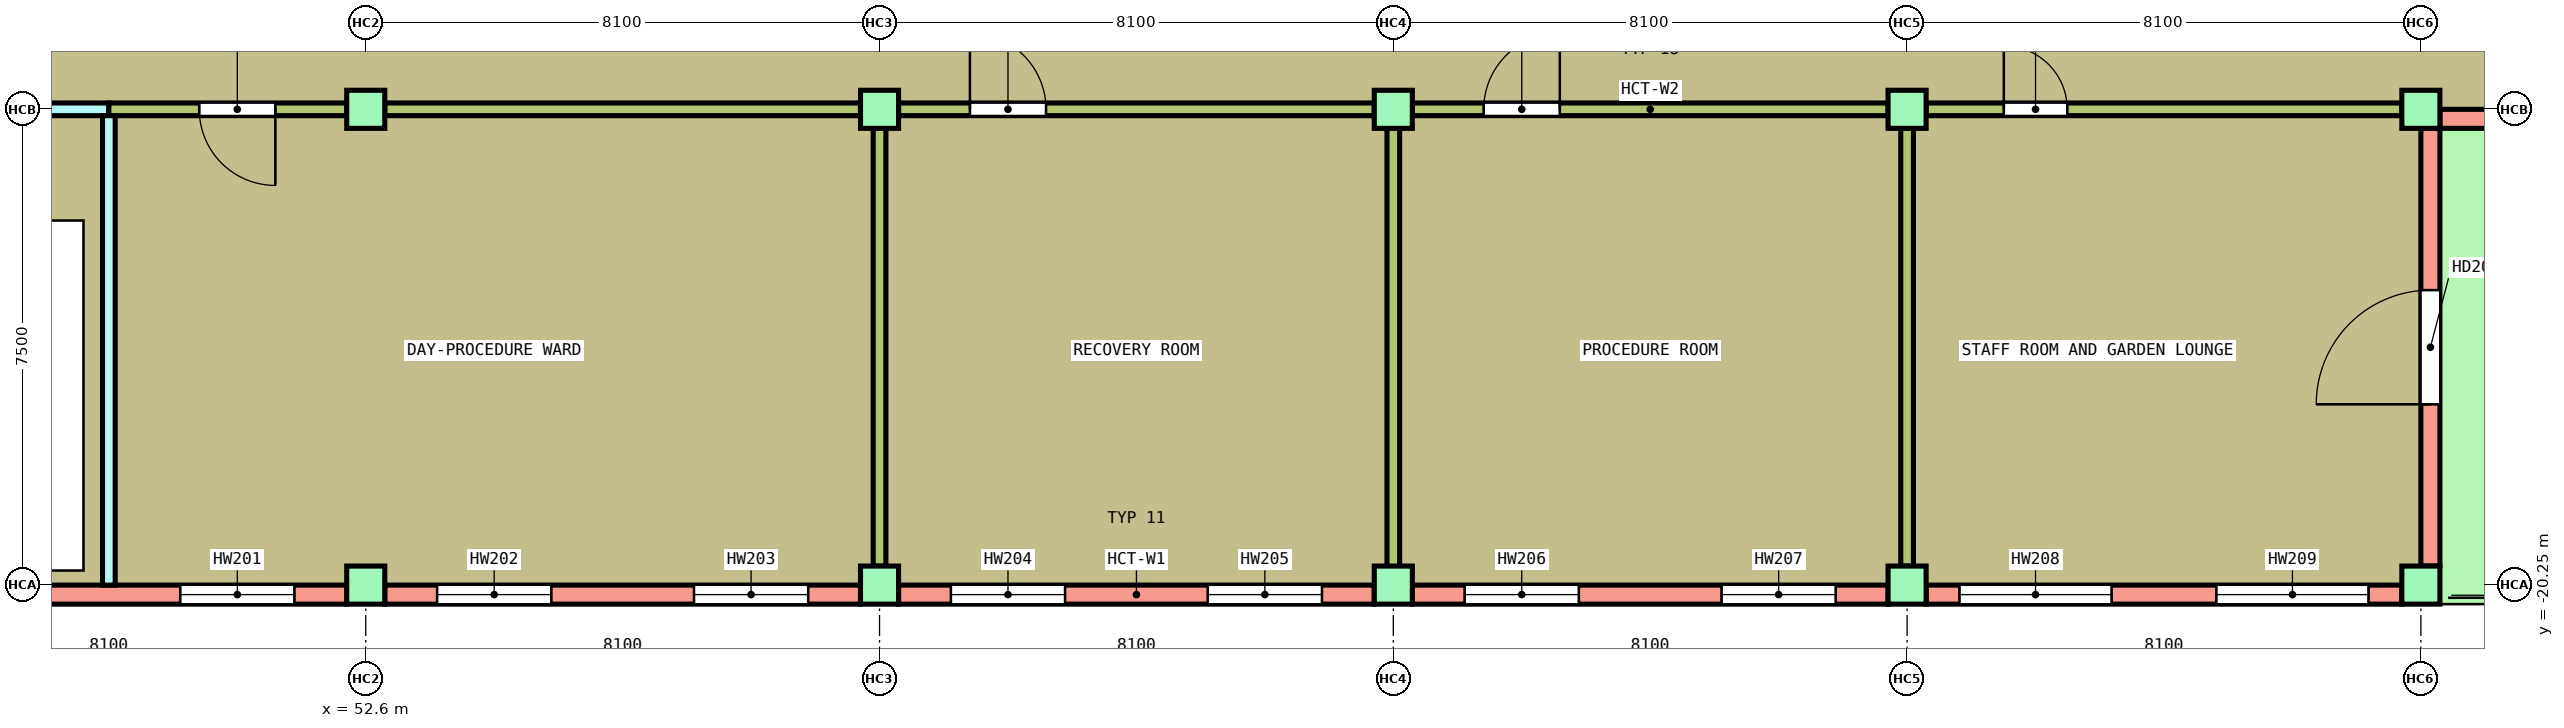
"""IFC4 building model, lengths in metres.
Left out: names, types, materials, properties, quantities, classifications, styles, units other than length and angle.
Written with IfcOpenShell. Run it as: python <this file> out.ifc"""

import sys

from ifc_helpers import new_model, si_unit, direction, frame, frame_2d, origin, origin_2d, place, context, subcontext, project, spatial, rectangle, extrude, element, fill, save


model = new_model("IFC4")
c1 = context("Model", 3, precision=1e-05, world=origin(), true_north=direction((0.0, 1.0)))
c2 = subcontext(c1, "Body", "Model", "MODEL_VIEW")
j1 = project(units=[si_unit("LENGTHUNIT", "METRE"), si_unit("PLANEANGLEUNIT", "RADIAN")], contexts=[c1])
p1 = place(None, origin())
s1 = spatial("IfcSite", under=j1, at=p1, CompositionType="ELEMENT")
p2 = place(p1, origin())
s2 = spatial("IfcBuilding", under=s1, at=p2, CompositionType="ELEMENT")
p3 = place(p2, frame((0.0, 0.0, 10.2)))
s3 = spatial("IfcBuildingStorey", under=s2, at=p3, CompositionType="ELEMENT", Elevation=10.2)
for number, where, z_axis, x_axis in (
    (1, (52.6, -20.25, 0.0), (0.0, 0.0, 1.0), (1.0, 0.0, 0.0)),
    (2, (60.7, -20.25, 0.0), (0.0, 0.0, 1.0), (1.0, 0.0, 0.0)),
    (3, (68.8, -20.25, 0.0), (0.0, 0.0, 1.0), (1.0, 0.0, 0.0)),
    (4, (76.9, -20.25, 0.0), (0.0, 0.0, 1.0), (1.0, 0.0, 0.0)),
    (5, (85.0, -20.25, 0.0), (0.0, 0.0, 1.0), (1.0, 0.0, 0.0)),
    (6, (52.6, -12.75, 0.0), (0.0, 0.0, 1.0), (1.0, 0.0, 0.0)),
    (7, (60.7, -12.75, 0.0), (0.0, 0.0, 1.0), (1.0, 0.0, 0.0)),
    (8, (68.8, -12.75, 0.0), (0.0, 0.0, 1.0), (1.0, 0.0, 0.0)),
    (9, (76.9, -12.75, 0.0), (0.0, 0.0, 1.0), (1.0, 0.0, 0.0)),
    (10, (85.0, -12.75, 0.0), (0.0, 0.0, 1.0), (1.0, 0.0, 0.0)),
):
    element("IfcColumn", number, at=place(p3, frame(where, z_axis=z_axis, x_axis=x_axis)), inside=s3, PredefinedType="COLUMN", context=c2, shape_type="SweptSolid", body=[
        extrude(rectangle(XDim=0.6, YDim=0.6, at=origin_2d()), origin(), (0.0, 0.0, 1.0), 4.15),
    ])
p4 = place(p3, frame((44.8, -20.4, 0.0), z_axis=(0.0, 0.0, 1.0), x_axis=(1.0, 0.0, 0.0)))
e11 = element("IfcWall", 11, at=p4, inside=s3, PredefinedType="SOLIDWALL", context=c2, shape_type="SweptSolid", body=[
    extrude(rectangle(XDim=7.5, YDim=0.3, at=frame_2d((3.75, 0.0))), origin(), (0.0, 0.0, 1.0), 3.6),
])
p5 = place(p4, frame((4.875, 0.0, 0.9)))
e12 = element("IfcOpeningElement", 12, at=p5, cuts=e11, PredefinedType="OPENING", context=c2, shape_type="SweptSolid", body=[
    extrude(rectangle(XDim=1.8, YDim=1.8, at=frame_2d((0.9, 0.9))), frame((0.0, 0.16, 0.0), z_axis=(0.0, -1.0, 0.0), x_axis=(1.0, 0.0, 0.0)), (0.0, 0.0, 1.0), 0.32),
])
p6 = place(p3, frame((52.9, -20.4, 0.0), z_axis=(0.0, 0.0, 1.0), x_axis=(1.0, 0.0, 0.0)))
e13 = element("IfcWall", 13, at=p6, inside=s3, PredefinedType="SOLIDWALL", context=c2, shape_type="SweptSolid", body=[
    extrude(rectangle(XDim=7.5, YDim=0.3, at=frame_2d((3.75, 0.0))), origin(), (0.0, 0.0, 1.0), 3.6),
])
p7 = place(p6, frame((0.825, 0.0, 0.9)))
e14 = element("IfcOpeningElement", 14, at=p7, cuts=e13, PredefinedType="OPENING", context=c2, shape_type="SweptSolid", body=[
    extrude(rectangle(XDim=1.8, YDim=1.8, at=frame_2d((0.9, 0.9))), frame((0.0, 0.16, 0.0), z_axis=(0.0, -1.0, 0.0), x_axis=(1.0, 0.0, 0.0)), (0.0, 0.0, 1.0), 0.32),
])
p8 = place(p6, frame((4.875, 0.0, 0.9)))
e15 = element("IfcOpeningElement", 15, at=p8, cuts=e13, PredefinedType="OPENING", context=c2, shape_type="SweptSolid", body=[
    extrude(rectangle(XDim=1.8, YDim=1.8, at=frame_2d((0.9, 0.9))), frame((0.0, 0.16, 0.0), z_axis=(0.0, -1.0, 0.0), x_axis=(1.0, 0.0, 0.0)), (0.0, 0.0, 1.0), 0.32),
])
p9 = place(p3, frame((61.0, -20.4, 0.0), z_axis=(0.0, 0.0, 1.0), x_axis=(1.0, 0.0, 0.0)))
e16 = element("IfcWall", 16, at=p9, inside=s3, PredefinedType="SOLIDWALL", context=c2, shape_type="SweptSolid", body=[
    extrude(rectangle(XDim=7.5, YDim=0.3, at=frame_2d((3.75, 0.0))), origin(), (0.0, 0.0, 1.0), 3.6),
])
p10 = place(p9, frame((0.825, 0.0, 0.9)))
e17 = element("IfcOpeningElement", 17, at=p10, cuts=e16, PredefinedType="OPENING", context=c2, shape_type="SweptSolid", body=[
    extrude(rectangle(XDim=1.8, YDim=1.8, at=frame_2d((0.9, 0.9))), frame((0.0, 0.16, 0.0), z_axis=(0.0, -1.0, 0.0), x_axis=(1.0, 0.0, 0.0)), (0.0, 0.0, 1.0), 0.32),
])
p11 = place(p9, frame((4.875, 0.0, 0.9)))
e18 = element("IfcOpeningElement", 18, at=p11, cuts=e16, PredefinedType="OPENING", context=c2, shape_type="SweptSolid", body=[
    extrude(rectangle(XDim=1.8, YDim=1.8, at=frame_2d((0.9, 0.9))), frame((0.0, 0.16, 0.0), z_axis=(0.0, -1.0, 0.0), x_axis=(1.0, 0.0, 0.0)), (0.0, 0.0, 1.0), 0.32),
])
p12 = place(p3, frame((69.1, -20.4, 0.0), z_axis=(0.0, 0.0, 1.0), x_axis=(1.0, 0.0, 0.0)))
e19 = element("IfcWall", 19, at=p12, inside=s3, PredefinedType="SOLIDWALL", context=c2, shape_type="SweptSolid", body=[
    extrude(rectangle(XDim=7.5, YDim=0.3, at=frame_2d((3.75, 0.0))), origin(), (0.0, 0.0, 1.0), 3.6),
])
p13 = place(p12, frame((0.825, 0.0, 0.9)))
e20 = element("IfcOpeningElement", 20, at=p13, cuts=e19, PredefinedType="OPENING", context=c2, shape_type="SweptSolid", body=[
    extrude(rectangle(XDim=1.8, YDim=1.8, at=frame_2d((0.9, 0.9))), frame((0.0, 0.16, 0.0), z_axis=(0.0, -1.0, 0.0), x_axis=(1.0, 0.0, 0.0)), (0.0, 0.0, 1.0), 0.32),
])
p14 = place(p12, frame((4.875, 0.0, 0.9)))
e21 = element("IfcOpeningElement", 21, at=p14, cuts=e19, PredefinedType="OPENING", context=c2, shape_type="SweptSolid", body=[
    extrude(rectangle(XDim=1.8, YDim=1.8, at=frame_2d((0.9, 0.9))), frame((0.0, 0.16, 0.0), z_axis=(0.0, -1.0, 0.0), x_axis=(1.0, 0.0, 0.0)), (0.0, 0.0, 1.0), 0.32),
])
p15 = place(p3, frame((77.2, -20.4, 0.0), z_axis=(0.0, 0.0, 1.0), x_axis=(1.0, 0.0, 0.0)))
e22 = element("IfcWall", 22, at=p15, inside=s3, PredefinedType="SOLIDWALL", context=c2, shape_type="SweptSolid", body=[
    extrude(rectangle(XDim=7.5, YDim=0.3, at=frame_2d((3.75, 0.0))), origin(), (0.0, 0.0, 1.0), 3.6),
])
p16 = place(p15, frame((0.525, 0.0, 0.3)))
e23 = element("IfcOpeningElement", 23, at=p16, cuts=e22, PredefinedType="OPENING", context=c2, shape_type="SweptSolid", body=[
    extrude(rectangle(XDim=2.4, YDim=2.4, at=frame_2d((1.2, 1.2))), frame((0.0, 0.16, 0.0), z_axis=(0.0, -1.0, 0.0), x_axis=(1.0, 0.0, 0.0)), (0.0, 0.0, 1.0), 0.32),
])
p17 = place(p15, frame((4.575, 0.0, 0.3)))
e24 = element("IfcOpeningElement", 24, at=p17, cuts=e22, PredefinedType="OPENING", context=c2, shape_type="SweptSolid", body=[
    extrude(rectangle(XDim=2.4, YDim=2.4, at=frame_2d((1.2, 1.2))), frame((0.0, 0.16, 0.0), z_axis=(0.0, -1.0, 0.0), x_axis=(1.0, 0.0, 0.0)), (0.0, 0.0, 1.0), 0.32),
])
p18 = place(p3, frame((44.8, -12.75, 0.0), z_axis=(0.0, 0.0, 1.0), x_axis=(1.0, 0.0, 0.0)))
e25 = element("IfcWall", 25, at=p18, inside=s3, PredefinedType="SOLIDWALL", context=c2, shape_type="SweptSolid", body=[
    extrude(rectangle(XDim=3.75, YDim=0.2, at=frame_2d((1.875, 0.0))), origin(), (0.0, 0.0, 1.0), 3.6),
])
p19 = place(p18, frame((1.175, 0.0, 0.0)))
e26 = element("IfcOpeningElement", 26, at=p19, cuts=e25, PredefinedType="OPENING", context=c2, shape_type="SweptSolid", body=[
    extrude(rectangle(XDim=1.1, YDim=2.1, at=frame_2d((0.55, 1.05))), frame((0.0, 0.11, 0.0), z_axis=(0.0, -1.0, 0.0), x_axis=(1.0, 0.0, 0.0)), (0.0, 0.0, 1.0), 0.22),
])
p20 = place(p3, frame((48.55, -12.75, 0.0), z_axis=(0.0, 0.0, 1.0), x_axis=(1.0, 0.0, 0.0)))
e27 = element("IfcWall", 27, at=p20, inside=s3, PredefinedType="PARTITIONING", context=c2, shape_type="SweptSolid", body=[
    extrude(rectangle(XDim=3.75, YDim=0.2, at=frame_2d((1.875, 0.0))), origin(), (0.0, 0.0, 1.0), 3.6),
])
p21 = place(p20, frame((1.425, 0.0, 0.0)))
e28 = element("IfcOpeningElement", 28, at=p21, cuts=e27, PredefinedType="OPENING", context=c2, shape_type="SweptSolid", body=[
    extrude(rectangle(XDim=1.2, YDim=2.1, at=frame_2d((0.6, 1.05))), frame((0.0, 0.11, 0.0), z_axis=(0.0, -1.0, 0.0), x_axis=(1.0, 0.0, 0.0)), (0.0, 0.0, 1.0), 0.22),
])
p22 = place(p3, frame((52.9, -12.75, 0.0), z_axis=(0.0, 0.0, 1.0), x_axis=(1.0, 0.0, 0.0)))
e29 = element("IfcWall", 29, at=p22, inside=s3, PredefinedType="PARTITIONING", context=c2, shape_type="SweptSolid", body=[
    extrude(rectangle(XDim=7.5, YDim=0.2, at=frame_2d((3.75, 0.0))), origin(), (0.0, 0.0, 1.0), 3.6),
])
p23 = place(p3, frame((61.0, -12.75, 0.0), z_axis=(0.0, 0.0, 1.0), x_axis=(1.0, 0.0, 0.0)))
e30 = element("IfcWall", 30, at=p23, inside=s3, PredefinedType="PARTITIONING", context=c2, shape_type="SweptSolid", body=[
    extrude(rectangle(XDim=7.5, YDim=0.2, at=frame_2d((3.75, 0.0))), origin(), (0.0, 0.0, 1.0), 3.6),
])
p24 = place(p23, frame((1.125, 0.0, 0.0)))
e31 = element("IfcOpeningElement", 31, at=p24, cuts=e30, PredefinedType="OPENING", context=c2, shape_type="SweptSolid", body=[
    extrude(rectangle(XDim=1.2, YDim=2.1, at=frame_2d((0.6, 1.05))), frame((0.0, 0.11, 0.0), z_axis=(0.0, -1.0, 0.0), x_axis=(1.0, 0.0, 0.0)), (0.0, 0.0, 1.0), 0.22),
])
p25 = place(p3, frame((69.1, -12.75, 0.0), z_axis=(0.0, 0.0, 1.0), x_axis=(1.0, 0.0, 0.0)))
e32 = element("IfcWall", 32, at=p25, inside=s3, PredefinedType="PARTITIONING", context=c2, shape_type="SweptSolid", body=[
    extrude(rectangle(XDim=7.5, YDim=0.2, at=frame_2d((3.75, 0.0))), origin(), (0.0, 0.0, 1.0), 3.6),
])
p26 = place(p25, frame((1.125, 0.0, 0.0)))
e33 = element("IfcOpeningElement", 33, at=p26, cuts=e32, PredefinedType="OPENING", context=c2, shape_type="SweptSolid", body=[
    extrude(rectangle(XDim=1.2, YDim=2.1, at=frame_2d((0.6, 1.05))), frame((0.0, 0.11, 0.0), z_axis=(0.0, -1.0, 0.0), x_axis=(1.0, 0.0, 0.0)), (0.0, 0.0, 1.0), 0.22),
])
p27 = place(p3, frame((77.2, -12.75, 0.0), z_axis=(0.0, 0.0, 1.0), x_axis=(1.0, 0.0, 0.0)))
e34 = element("IfcWall", 34, at=p27, inside=s3, PredefinedType="PARTITIONING", context=c2, shape_type="SweptSolid", body=[
    extrude(rectangle(XDim=7.5, YDim=0.2, at=frame_2d((3.75, 0.0))), origin(), (0.0, 0.0, 1.0), 3.6),
])
p28 = place(p27, frame((1.225, 0.0, 0.0)))
e35 = element("IfcOpeningElement", 35, at=p28, cuts=e34, PredefinedType="OPENING", context=c2, shape_type="SweptSolid", body=[
    extrude(rectangle(XDim=1.0, YDim=2.1, at=frame_2d((0.5, 1.05))), frame((0.0, 0.11, 0.0), z_axis=(0.0, -1.0, 0.0), x_axis=(1.0, 0.0, 0.0)), (0.0, 0.0, 1.0), 0.22),
])
p29 = place(p3, frame((48.55, -20.25, 0.0), z_axis=(0.0, 0.0, 1.0), x_axis=(0.0, 1.0, 0.0)))
e36 = element("IfcWall", 36, at=p29, inside=s3, PredefinedType="SOLIDWALL", context=c2, shape_type="SweptSolid", body=[
    extrude(rectangle(XDim=7.4, YDim=0.2, at=frame_2d((3.7, 0.0))), origin(), (0.0, 0.0, 1.0), 3.6),
])
p30 = place(p3, frame((60.7, -19.95, 0.0), z_axis=(0.0, 0.0, 1.0), x_axis=(0.0, 1.0, 0.0)))
e37 = element("IfcWall", 37, at=p30, inside=s3, PredefinedType="PARTITIONING", context=c2, shape_type="SweptSolid", body=[
    extrude(rectangle(XDim=6.9, YDim=0.2, at=frame_2d((3.45, 0.0))), origin(), (0.0, 0.0, 1.0), 3.6),
])
p31 = place(p3, frame((68.8, -20.25, 0.0), z_axis=(0.0, 0.0, 1.0), x_axis=(0.0, 1.0, 0.0)))
e38 = element("IfcWall", 38, at=p31, inside=s3, PredefinedType="PARTITIONING", context=c2, shape_type="SweptSolid", body=[
    extrude(rectangle(XDim=7.5, YDim=0.2, at=frame_2d((3.75, 0.0))), origin(), (0.0, 0.0, 1.0), 3.6),
])
p32 = place(p3, frame((76.9, -19.95, 0.0), z_axis=(0.0, 0.0, 1.0), x_axis=(0.0, 1.0, 0.0)))
e39 = element("IfcWall", 39, at=p32, inside=s3, PredefinedType="PARTITIONING", context=c2, shape_type="SweptSolid", body=[
    extrude(rectangle(XDim=6.9, YDim=0.2, at=frame_2d((3.45, 0.0))), origin(), (0.0, 0.0, 1.0), 3.6),
])
p33 = place(p3, frame((85.15, -13.05, 0.0), z_axis=(0.0, 0.0, 1.0), x_axis=(0.0, -1.0, 0.0)))
e40 = element("IfcWall", 40, at=p33, inside=s3, PredefinedType="SOLIDWALL", context=c2, shape_type="SweptSolid", body=[
    extrude(rectangle(XDim=6.9, YDim=0.3, at=frame_2d((3.45, 0.0))), origin(), (0.0, 0.0, 1.0), 3.6),
])
p34 = place(p33, frame((2.55, 0.0, 0.0)))
e41 = element("IfcOpeningElement", 41, at=p34, cuts=e40, PredefinedType="OPENING", context=c2, shape_type="SweptSolid", body=[
    extrude(rectangle(XDim=1.8, YDim=2.1, at=frame_2d((0.9, 1.05))), frame((0.0, 0.16, 0.0), z_axis=(0.0, -1.0, 0.0), x_axis=(1.0, 0.0, 0.0)), (0.0, 0.0, 1.0), 0.32),
])
p35 = place(p3, frame((85.3, -12.9, 0.0), z_axis=(0.0, 0.0, 1.0), x_axis=(1.0, 0.0, 0.0)))
e42 = element("IfcWall", 42, at=p35, inside=s3, PredefinedType="SOLIDWALL", context=c2, shape_type="SweptSolid", body=[
    extrude(rectangle(XDim=7.5, YDim=0.3, at=frame_2d((3.75, 0.0))), origin(), (0.0, 0.0, 1.0), 3.6),
])
p36 = place(p35, frame((2.85, 0.0, 0.0)))
e43 = element("IfcOpeningElement", 43, at=p36, cuts=e42, PredefinedType="OPENING", context=c2, shape_type="SweptSolid", body=[
    extrude(rectangle(XDim=1.8, YDim=2.1, at=frame_2d((0.9, 1.05))), frame((0.0, 0.16, 0.0), z_axis=(0.0, -1.0, 0.0), x_axis=(1.0, 0.0, 0.0)), (0.0, 0.0, 1.0), 0.32),
])
p37 = place(p21, origin())
e44 = element("IfcDoor", 44, at=p37, inside=s3, OperationType="SINGLE_SWING_LEFT", PredefinedType="DOOR", context=c2, shape_type="SweptSolid", body=[
    extrude(rectangle(XDim=1.2, YDim=2.1, at=frame_2d((0.6, 1.05))), frame((0.0, 0.025, 0.0), z_axis=(0.0, -1.0, 0.0), x_axis=(1.0, 0.0, 0.0)), (0.0, 0.0, 1.0), 0.05),
])
fill(e28, e44)
p38 = place(p24, origin())
e45 = element("IfcDoor", 45, at=p38, inside=s3, OperationType="SINGLE_SWING_RIGHT", PredefinedType="DOOR", context=c2, shape_type="SweptSolid", body=[
    extrude(rectangle(XDim=1.2, YDim=2.1, at=frame_2d((0.6, 1.05))), frame((0.0, 0.025, 0.0), z_axis=(0.0, -1.0, 0.0), x_axis=(1.0, 0.0, 0.0)), (0.0, 0.0, 1.0), 0.05),
])
fill(e31, e45)
p39 = place(p26, origin())
e46 = element("IfcDoor", 46, at=p39, inside=s3, OperationType="SINGLE_SWING_LEFT", PredefinedType="DOOR", context=c2, shape_type="SweptSolid", body=[
    extrude(rectangle(XDim=1.2, YDim=2.1, at=frame_2d((0.6, 1.05))), frame((0.0, 0.025, 0.0), z_axis=(0.0, -1.0, 0.0), x_axis=(1.0, 0.0, 0.0)), (0.0, 0.0, 1.0), 0.05),
])
fill(e33, e46)
p40 = place(p28, origin())
e47 = element("IfcDoor", 47, at=p40, inside=s3, OperationType="SINGLE_SWING_RIGHT", PredefinedType="DOOR", context=c2, shape_type="SweptSolid", body=[
    extrude(rectangle(XDim=1.0, YDim=2.1, at=frame_2d((0.5, 1.05))), frame((0.0, 0.025, 0.0), z_axis=(0.0, -1.0, 0.0), x_axis=(1.0, 0.0, 0.0)), (0.0, 0.0, 1.0), 0.05),
])
fill(e35, e47)
p41 = place(p34, origin())
e48 = element("IfcDoor", 48, at=p41, inside=s3, OperationType="DOUBLE_DOOR_SINGLE_SWING", PredefinedType="DOOR", context=c2, shape_type="SweptSolid", body=[
    extrude(rectangle(XDim=1.8, YDim=2.1, at=frame_2d((0.9, 1.05))), frame((0.0, 0.025, 0.0), z_axis=(0.0, -1.0, 0.0), x_axis=(1.0, 0.0, 0.0)), (0.0, 0.0, 1.0), 0.05),
])
fill(e41, e48)
p42 = place(p5, origin())
e49 = element("IfcWindow", 49, at=p42, inside=s3, PartitioningType="SINGLE_PANEL", PredefinedType="WINDOW", context=c2, shape_type="SweptSolid", body=[
    extrude(rectangle(XDim=1.8, YDim=1.8, at=frame_2d((0.9, 0.9))), frame((0.0, 0.03, 0.0), z_axis=(0.0, -1.0, 0.0), x_axis=(1.0, 0.0, 0.0)), (0.0, 0.0, 1.0), 0.06),
])
fill(e12, e49)
p43 = place(p7, origin())
e50 = element("IfcWindow", 50, at=p43, inside=s3, PartitioningType="SINGLE_PANEL", PredefinedType="WINDOW", context=c2, shape_type="SweptSolid", body=[
    extrude(rectangle(XDim=1.8, YDim=1.8, at=frame_2d((0.9, 0.9))), frame((0.0, 0.03, 0.0), z_axis=(0.0, -1.0, 0.0), x_axis=(1.0, 0.0, 0.0)), (0.0, 0.0, 1.0), 0.06),
])
fill(e14, e50)
p44 = place(p8, origin())
e51 = element("IfcWindow", 51, at=p44, inside=s3, PartitioningType="SINGLE_PANEL", PredefinedType="WINDOW", context=c2, shape_type="SweptSolid", body=[
    extrude(rectangle(XDim=1.8, YDim=1.8, at=frame_2d((0.9, 0.9))), frame((0.0, 0.03, 0.0), z_axis=(0.0, -1.0, 0.0), x_axis=(1.0, 0.0, 0.0)), (0.0, 0.0, 1.0), 0.06),
])
fill(e15, e51)
p45 = place(p10, origin())
e52 = element("IfcWindow", 52, at=p45, inside=s3, PartitioningType="SINGLE_PANEL", PredefinedType="WINDOW", context=c2, shape_type="SweptSolid", body=[
    extrude(rectangle(XDim=1.8, YDim=1.8, at=frame_2d((0.9, 0.9))), frame((0.0, 0.03, 0.0), z_axis=(0.0, -1.0, 0.0), x_axis=(1.0, 0.0, 0.0)), (0.0, 0.0, 1.0), 0.06),
])
fill(e17, e52)
p46 = place(p11, origin())
e53 = element("IfcWindow", 53, at=p46, inside=s3, PartitioningType="SINGLE_PANEL", PredefinedType="WINDOW", context=c2, shape_type="SweptSolid", body=[
    extrude(rectangle(XDim=1.8, YDim=1.8, at=frame_2d((0.9, 0.9))), frame((0.0, 0.03, 0.0), z_axis=(0.0, -1.0, 0.0), x_axis=(1.0, 0.0, 0.0)), (0.0, 0.0, 1.0), 0.06),
])
fill(e18, e53)
p47 = place(p13, origin())
e54 = element("IfcWindow", 54, at=p47, inside=s3, PartitioningType="SINGLE_PANEL", PredefinedType="WINDOW", context=c2, shape_type="SweptSolid", body=[
    extrude(rectangle(XDim=1.8, YDim=1.8, at=frame_2d((0.9, 0.9))), frame((0.0, 0.03, 0.0), z_axis=(0.0, -1.0, 0.0), x_axis=(1.0, 0.0, 0.0)), (0.0, 0.0, 1.0), 0.06),
])
fill(e20, e54)
p48 = place(p14, origin())
e55 = element("IfcWindow", 55, at=p48, inside=s3, PartitioningType="SINGLE_PANEL", PredefinedType="WINDOW", context=c2, shape_type="SweptSolid", body=[
    extrude(rectangle(XDim=1.8, YDim=1.8, at=frame_2d((0.9, 0.9))), frame((0.0, 0.03, 0.0), z_axis=(0.0, -1.0, 0.0), x_axis=(1.0, 0.0, 0.0)), (0.0, 0.0, 1.0), 0.06),
])
fill(e21, e55)
p49 = place(p16, origin())
e56 = element("IfcWindow", 56, at=p49, inside=s3, PartitioningType="DOUBLE_PANEL_VERTICAL", PredefinedType="WINDOW", context=c2, shape_type="SweptSolid", body=[
    extrude(rectangle(XDim=2.4, YDim=2.4, at=frame_2d((1.2, 1.2))), frame((0.0, 0.03, 0.0), z_axis=(0.0, -1.0, 0.0), x_axis=(1.0, 0.0, 0.0)), (0.0, 0.0, 1.0), 0.06),
])
fill(e23, e56)
p50 = place(p17, origin())
e57 = element("IfcWindow", 57, at=p50, inside=s3, PartitioningType="DOUBLE_PANEL_VERTICAL", PredefinedType="WINDOW", context=c2, shape_type="SweptSolid", body=[
    extrude(rectangle(XDim=2.4, YDim=2.4, at=frame_2d((1.2, 1.2))), frame((0.0, 0.03, 0.0), z_axis=(0.0, -1.0, 0.0), x_axis=(1.0, 0.0, 0.0)), (0.0, 0.0, 1.0), 0.06),
])
fill(e24, e57)
save(model, sys.argv[1])
